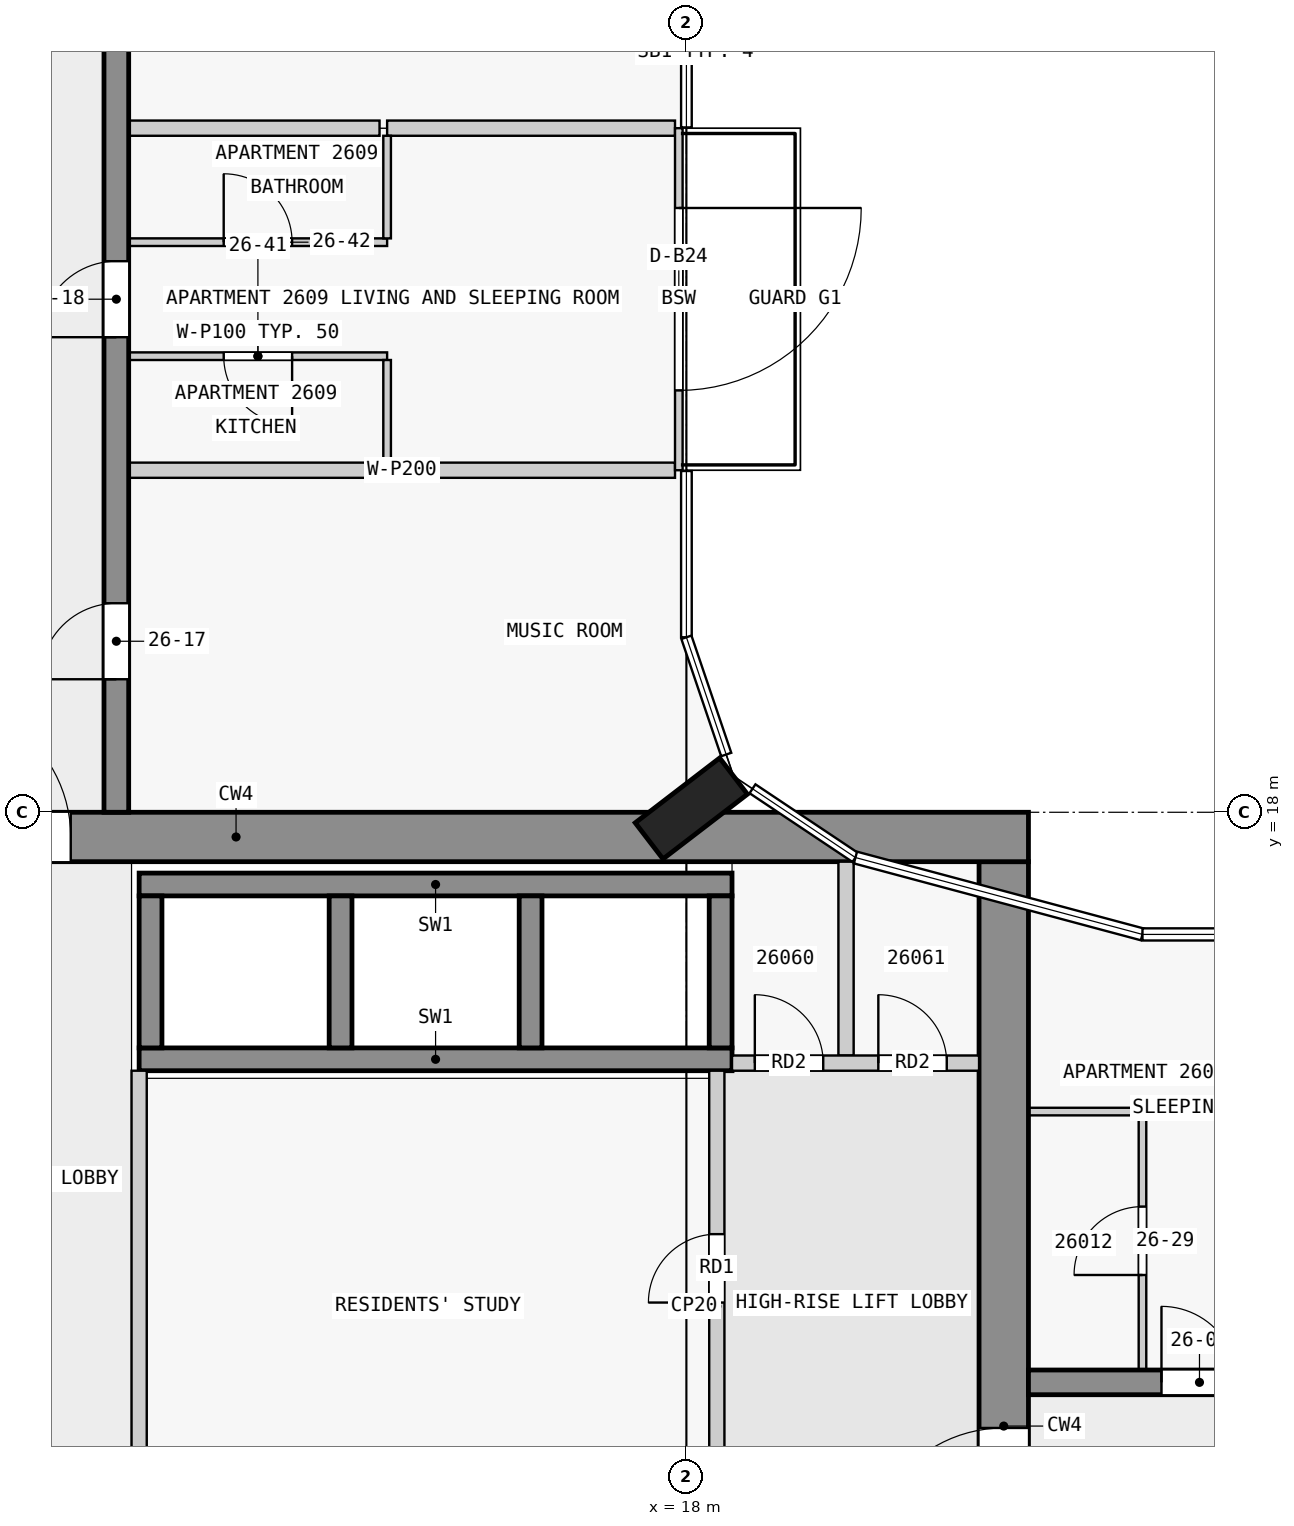
"""IFC4 building model, lengths in metres.
Left out: names, types, materials, properties, quantities, classifications, styles, units other than length and angle.
Written with IfcOpenShell. Run it as: python <this file> out.ifc"""

import sys

from ifc_helpers import new_model, si_unit, direction, frame, frame_2d, origin, origin_2d, place, context, subcontext, project, spatial, rectangle, extrude, element, fill, save


model = new_model("IFC4")
c1 = context("Model", 3, precision=1e-05, world=origin(), true_north=direction((0.0, 1.0)))
c2 = subcontext(c1, "Body", "Model", "MODEL_VIEW")
j1 = project(units=[si_unit("LENGTHUNIT", "METRE"), si_unit("PLANEANGLEUNIT", "RADIAN")], contexts=[c1])
p1 = place(None, origin())
s1 = spatial("IfcSite", under=j1, at=p1, CompositionType="ELEMENT")
p2 = place(p1, origin())
s2 = spatial("IfcBuilding", under=s1, at=p2, CompositionType="ELEMENT")
p3 = place(p2, frame((0.0, 0.0, 102.8)))
s3 = spatial("IfcBuildingStorey", under=s2, at=p3, CompositionType="ELEMENT", Elevation=102.8)
p4 = place(p3, frame((18.065, 18.05, 0.0), z_axis=(0.0, 0.0, 1.0), x_axis=(-0.608810846443, 0.793315418515, 0.0)))
e1 = element("IfcColumn", 1, at=p4, inside=s3, PredefinedType="COLUMN", context=c2, shape_type="SweptSolid", body=[
    extrude(rectangle(XDim=0.6, YDim=1.4, at=origin_2d()), origin(), (0.0, 0.0, 1.0), 3.5),
])
p5 = place(p3, frame((1.65, 17.675, 0.0), z_axis=(0.0, 0.0, 1.0), x_axis=(1.0, 0.0, 0.0)))
e2 = element("IfcWall", 2, at=p5, inside=s3, PredefinedType="SHEAR", context=c2, shape_type="SweptSolid", body=[
    extrude(rectangle(XDim=20.85, YDim=0.65, at=frame_2d((10.425, 0.0))), origin(), (0.0, 0.0, 1.0), 3.25),
])
p6 = place(p5, frame((6.45, 0.0, 0.0)))
e3 = element("IfcOpeningElement", 3, at=p6, cuts=e2, PredefinedType="OPENING", context=c2, shape_type="SweptSolid", body=[
    extrude(rectangle(XDim=1.8, YDim=2.1, at=frame_2d((0.9, 1.05))), frame((0.0, 0.335, 0.0), z_axis=(0.0, -1.0, 0.0), x_axis=(1.0, 0.0, 0.0)), (0.0, 0.0, 1.0), 0.67),
])
p7 = place(p3, frame((22.175, 2.5, 0.0), z_axis=(0.0, 0.0, 1.0), x_axis=(0.0, 1.0, 0.0)))
e4 = element("IfcWall", 4, at=p7, inside=s3, PredefinedType="SHEAR", context=c2, shape_type="SweptSolid", body=[
    extrude(rectangle(XDim=14.85, YDim=0.65, at=frame_2d((7.425, 0.0))), origin(), (0.0, 0.0, 1.0), 3.25),
])
p8 = place(p7, frame((5.6, 0.0, 0.0)))
e5 = element("IfcOpeningElement", 5, at=p8, cuts=e4, PredefinedType="OPENING", context=c2, shape_type="SweptSolid", body=[
    extrude(rectangle(XDim=1.8, YDim=2.1, at=frame_2d((0.9, 1.05))), frame((0.0, 0.335, 0.0), z_axis=(0.0, -1.0, 0.0), x_axis=(1.0, 0.0, 0.0)), (0.0, 0.0, 1.0), 0.67),
])
for number, where, z_axis, x_axis in (
    (6, (10.8, 17.05, 0.0), (0.0, 0.0, 1.0), (1.0, 0.0, 0.0)),
    (7, (10.8, 14.75, 0.0), (0.0, 0.0, 1.0), (1.0, 0.0, 0.0)),
):
    element("IfcWall", number, at=place(p3, frame(where, z_axis=z_axis, x_axis=x_axis)), inside=s3, PredefinedType="SHEAR", context=c2, shape_type="SweptSolid", body=[
        extrude(rectangle(XDim=7.8, YDim=0.3, at=frame_2d((3.9, 0.0))), origin(), (0.0, 0.0, 1.0), 3.25),
    ])
for number, where, z_axis, x_axis in (
    (8, (10.95, 14.9, 0.0), (0.0, 0.0, 1.0), (0.0, 1.0, 0.0)),
    (9, (13.45, 14.9, 0.0), (0.0, 0.0, 1.0), (0.0, 1.0, 0.0)),
    (10, (15.95, 14.9, 0.0), (0.0, 0.0, 1.0), (0.0, 1.0, 0.0)),
    (11, (18.45, 14.9, 0.0), (0.0, 0.0, 1.0), (0.0, 1.0, 0.0)),
):
    element("IfcWall", number, at=place(p3, frame(where, z_axis=z_axis, x_axis=x_axis)), inside=s3, PredefinedType="SHEAR", context=c2, shape_type="SweptSolid", body=[
        extrude(rectangle(XDim=2.0, YDim=0.3, at=frame_2d((1.0, 0.0))), origin(), (0.0, 0.0, 1.0), 3.25),
    ])
p9 = place(p3, frame((22.5, 10.5, 0.0), z_axis=(0.0, 0.0, 1.0), x_axis=(1.0, 0.0, 0.0)))
e12 = element("IfcWall", 12, at=p9, inside=s3, PredefinedType="SHEAR", context=c2, shape_type="SweptSolid", body=[
    extrude(rectangle(XDim=22.5, YDim=0.325, at=frame_2d((11.25, 0.0))), origin(), (0.0, 0.0, 1.0), 3.25),
])
p10 = place(p9, frame((1.75, 0.0, 0.0)))
e13 = element("IfcOpeningElement", 13, at=p10, cuts=e12, PredefinedType="OPENING", context=c2, shape_type="SweptSolid", body=[
    extrude(rectangle(XDim=1.0, YDim=2.1, at=frame_2d((0.5, 1.05))), frame((0.0, 0.172, 0.0), z_axis=(0.0, -1.0, 0.0), x_axis=(1.0, 0.0, 0.0)), (0.0, 0.0, 1.0), 0.345),
])
p11 = place(p9, frame((6.25, 0.0, 0.0)))
e14 = element("IfcOpeningElement", 14, at=p11, cuts=e12, PredefinedType="OPENING", context=c2, shape_type="SweptSolid", body=[
    extrude(rectangle(XDim=1.0, YDim=2.1, at=frame_2d((0.5, 1.05))), frame((0.0, 0.172, 0.0), z_axis=(0.0, -1.0, 0.0), x_axis=(1.0, 0.0, 0.0)), (0.0, 0.0, 1.0), 0.345),
])
p12 = place(p9, frame((10.85, 0.0, 0.0)))
e15 = element("IfcOpeningElement", 15, at=p12, cuts=e12, PredefinedType="OPENING", context=c2, shape_type="SweptSolid", body=[
    extrude(rectangle(XDim=0.9, YDim=2.1, at=frame_2d((0.45, 1.05))), frame((0.0, 0.172, 0.0), z_axis=(0.0, -1.0, 0.0), x_axis=(1.0, 0.0, 0.0)), (0.0, 0.0, 1.0), 0.345),
])
p13 = place(p9, frame((15.25, 0.0, 0.0)))
e16 = element("IfcOpeningElement", 16, at=p13, cuts=e12, PredefinedType="OPENING", context=c2, shape_type="SweptSolid", body=[
    extrude(rectangle(XDim=1.0, YDim=2.1, at=frame_2d((0.5, 1.05))), frame((0.0, 0.172, 0.0), z_axis=(0.0, -1.0, 0.0), x_axis=(1.0, 0.0, 0.0)), (0.0, 0.0, 1.0), 0.345),
])
p14 = place(p9, frame((18.75, 0.0, 0.0)))
e17 = element("IfcOpeningElement", 17, at=p14, cuts=e12, PredefinedType="OPENING", context=c2, shape_type="SweptSolid", body=[
    extrude(rectangle(XDim=0.9, YDim=2.1, at=frame_2d((0.45, 1.05))), frame((0.0, 0.172, 0.0), z_axis=(0.0, -1.0, 0.0), x_axis=(1.0, 0.0, 0.0)), (0.0, 0.0, 1.0), 0.345),
])
p15 = place(p9, frame((20.95, 0.0, 0.0)))
e18 = element("IfcOpeningElement", 18, at=p15, cuts=e12, PredefinedType="OPENING", context=c2, shape_type="SweptSolid", body=[
    extrude(rectangle(XDim=1.0, YDim=2.1, at=frame_2d((0.5, 1.05))), frame((0.0, 0.172, 0.0), z_axis=(0.0, -1.0, 0.0), x_axis=(1.0, 0.0, 0.0)), (0.0, 0.0, 1.0), 0.345),
])
p16 = place(p3, frame((10.5, 18.0, 0.0), z_axis=(0.0, 0.0, 1.0), x_axis=(0.0, 1.0, 0.0)))
e19 = element("IfcWall", 19, at=p16, inside=s3, PredefinedType="SHEAR", context=c2, shape_type="SweptSolid", body=[
    extrude(rectangle(XDim=27.0, YDim=0.325, at=frame_2d((13.5, 0.0))), origin(), (0.0, 0.0, 1.0), 3.25),
])
p17 = place(p16, frame((1.75, 0.0, 0.0)))
e20 = element("IfcOpeningElement", 20, at=p17, cuts=e19, PredefinedType="OPENING", context=c2, shape_type="SweptSolid", body=[
    extrude(rectangle(XDim=1.0, YDim=2.1, at=frame_2d((0.5, 1.05))), frame((0.0, 0.172, 0.0), z_axis=(0.0, -1.0, 0.0), x_axis=(1.0, 0.0, 0.0)), (0.0, 0.0, 1.0), 0.345),
])
p18 = place(p16, frame((6.25, 0.0, 0.0)))
e21 = element("IfcOpeningElement", 21, at=p18, cuts=e19, PredefinedType="OPENING", context=c2, shape_type="SweptSolid", body=[
    extrude(rectangle(XDim=1.0, YDim=2.1, at=frame_2d((0.5, 1.05))), frame((0.0, 0.172, 0.0), z_axis=(0.0, -1.0, 0.0), x_axis=(1.0, 0.0, 0.0)), (0.0, 0.0, 1.0), 0.345),
])
p19 = place(p16, frame((13.05, 0.0, 0.0)))
e22 = element("IfcOpeningElement", 22, at=p19, cuts=e19, PredefinedType="OPENING", context=c2, shape_type="SweptSolid", body=[
    extrude(rectangle(XDim=1.0, YDim=2.1, at=frame_2d((0.5, 1.05))), frame((0.0, 0.172, 0.0), z_axis=(0.0, -1.0, 0.0), x_axis=(1.0, 0.0, 0.0)), (0.0, 0.0, 1.0), 0.345),
])
p20 = place(p16, frame((21.35, 0.0, 0.0)))
e23 = element("IfcOpeningElement", 23, at=p20, cuts=e19, PredefinedType="OPENING", context=c2, shape_type="SweptSolid", body=[
    extrude(rectangle(XDim=1.0, YDim=2.1, at=frame_2d((0.5, 1.05))), frame((0.0, 0.172, 0.0), z_axis=(0.0, -1.0, 0.0), x_axis=(1.0, 0.0, 0.0)), (0.0, 0.0, 1.0), 0.345),
])
p21 = place(p3, frame((17.9, 27.0, 0.0), z_axis=(0.0, 0.0, 1.0), x_axis=(0.0, -1.0, 0.0)))
e24 = element("IfcWall", 24, at=p21, inside=s3, PredefinedType="STANDARD", context=c2, shape_type="SweptSolid", body=[
    extrude(rectangle(XDim=4.5, YDim=0.1, at=frame_2d((2.25, 0.0))), origin(), (0.0, 0.0, 1.0), 3.25),
])
p22 = place(p21, frame((1.05, 0.0, 0.0)))
e25 = element("IfcOpeningElement", 25, at=p22, cuts=e24, PredefinedType="OPENING", context=c2, shape_type="SweptSolid", body=[
    extrude(rectangle(XDim=2.4, YDim=2.4, at=frame_2d((1.2, 1.2))), frame((0.0, 0.06, 0.0), z_axis=(0.0, -1.0, 0.0), x_axis=(1.0, 0.0, 0.0)), (0.0, 0.0, 1.0), 0.12),
])
p23 = place(p3, frame((10.8, 8.4, 0.0), z_axis=(0.0, 0.0, 1.0), x_axis=(0.0, 1.0, 0.0)))
e26 = element("IfcWall", 26, at=p23, inside=s3, PredefinedType="PARTITIONING", context=c2, shape_type="SweptSolid", body=[
    extrude(rectangle(XDim=6.2, YDim=0.2, at=frame_2d((3.1, 0.0))), origin(), (0.0, 0.0, 1.0), 3.25),
])
p24 = place(p3, frame((18.4, 8.4, 0.0), z_axis=(0.0, 0.0, 1.0), x_axis=(0.0, 1.0, 0.0)))
e27 = element("IfcWall", 27, at=p24, inside=s3, PredefinedType="PARTITIONING", context=c2, shape_type="SweptSolid", body=[
    extrude(rectangle(XDim=6.2, YDim=0.2, at=frame_2d((3.1, 0.0))), origin(), (0.0, 0.0, 1.0), 3.25),
])
p25 = place(p24, frame((3.15, 0.0, 0.0)))
e28 = element("IfcOpeningElement", 28, at=p25, cuts=e27, PredefinedType="OPENING", context=c2, shape_type="SweptSolid", body=[
    extrude(rectangle(XDim=0.9, YDim=2.1, at=frame_2d((0.45, 1.05))), frame((0.0, 0.11, 0.0), z_axis=(0.0, -1.0, 0.0), x_axis=(1.0, 0.0, 0.0)), (0.0, 0.0, 1.0), 0.22),
])
p26 = place(p3, frame((18.6, 14.7, 0.0), z_axis=(0.0, 0.0, 1.0), x_axis=(1.0, 0.0, 0.0)))
e29 = element("IfcWall", 29, at=p26, inside=s3, PredefinedType="PARTITIONING", context=c2, shape_type="SweptSolid", body=[
    extrude(rectangle(XDim=3.25, YDim=0.2, at=frame_2d((1.625, 0.0))), origin(), (0.0, 0.0, 1.0), 3.25),
])
p27 = place(p26, frame((0.3, 0.0, 0.0)))
e30 = element("IfcOpeningElement", 30, at=p27, cuts=e29, PredefinedType="OPENING", context=c2, shape_type="SweptSolid", body=[
    extrude(rectangle(XDim=0.9, YDim=2.1, at=frame_2d((0.45, 1.05))), frame((0.0, 0.11, 0.0), z_axis=(0.0, -1.0, 0.0), x_axis=(1.0, 0.0, 0.0)), (0.0, 0.0, 1.0), 0.22),
])
p28 = place(p26, frame((1.925, 0.0, 0.0)))
e31 = element("IfcOpeningElement", 31, at=p28, cuts=e29, PredefinedType="OPENING", context=c2, shape_type="SweptSolid", body=[
    extrude(rectangle(XDim=0.9, YDim=2.1, at=frame_2d((0.45, 1.05))), frame((0.0, 0.11, 0.0), z_axis=(0.0, -1.0, 0.0), x_axis=(1.0, 0.0, 0.0)), (0.0, 0.0, 1.0), 0.22),
])
p29 = place(p3, frame((20.1, 14.8, 0.0), z_axis=(0.0, 0.0, 1.0), x_axis=(0.0, 1.0, 0.0)))
e32 = element("IfcWall", 32, at=p29, inside=s3, PredefinedType="PARTITIONING", context=c2, shape_type="SweptSolid", body=[
    extrude(rectangle(XDim=2.55, YDim=0.2, at=frame_2d((1.275, 0.0))), origin(), (0.0, 0.0, 1.0), 3.25),
])
p30 = place(p3, frame((23.95, 14.062, 0.0), z_axis=(0.0, 0.0, 1.0), x_axis=(-1.0, 0.0, 0.0)))
e33 = element("IfcWall", 33, at=p30, inside=s3, PredefinedType="PARTITIONING", context=c2, shape_type="SweptSolid", body=[
    extrude(rectangle(XDim=1.45, YDim=0.1, at=frame_2d((0.725, 0.0))), origin(), (0.0, 0.0, 1.0), 3.25),
])
p31 = place(p3, frame((17.85, 22.5, 0.0), z_axis=(0.0, 0.0, 1.0), x_axis=(-1.0, 0.0, 0.0)))
e34 = element("IfcWall", 34, at=p31, inside=s3, PredefinedType="PARTITIONING", context=c2, shape_type="SweptSolid", body=[
    extrude(rectangle(XDim=7.188, YDim=0.2, at=frame_2d((3.594, 0.0))), origin(), (0.0, 0.0, 1.0), 3.25),
])
p32 = place(p3, frame((14.062, 24.0, 0.0), z_axis=(0.0, 0.0, 1.0), x_axis=(-1.0, 0.0, 0.0)))
e35 = element("IfcWall", 35, at=p32, inside=s3, PredefinedType="PARTITIONING", context=c2, shape_type="SweptSolid", body=[
    extrude(rectangle(XDim=3.4, YDim=0.1, at=frame_2d((1.7, 0.0))), origin(), (0.0, 0.0, 1.0), 3.25),
])
p33 = place(p32, frame((1.25, 0.0, 0.0)))
e36 = element("IfcOpeningElement", 36, at=p33, cuts=e35, PredefinedType="OPENING", context=c2, shape_type="SweptSolid", body=[
    extrude(rectangle(XDim=0.9, YDim=2.1, at=frame_2d((0.45, 1.05))), frame((0.0, 0.06, 0.0), z_axis=(0.0, -1.0, 0.0), x_axis=(1.0, 0.0, 0.0)), (0.0, 0.0, 1.0), 0.12),
])
p34 = place(p3, frame((10.663, 25.5, 0.0), z_axis=(0.0, 0.0, 1.0), x_axis=(1.0, 0.0, 0.0)))
e37 = element("IfcWall", 37, at=p34, inside=s3, PredefinedType="PARTITIONING", context=c2, shape_type="SweptSolid", body=[
    extrude(rectangle(XDim=3.4, YDim=0.1, at=frame_2d((1.7, 0.0))), origin(), (0.0, 0.0, 1.0), 3.25),
])
p35 = place(p34, frame((1.25, 0.0, 0.0)))
e38 = element("IfcOpeningElement", 38, at=p35, cuts=e37, PredefinedType="OPENING", context=c2, shape_type="SweptSolid", body=[
    extrude(rectangle(XDim=0.9, YDim=2.1, at=frame_2d((0.45, 1.05))), frame((0.0, 0.06, 0.0), z_axis=(0.0, -1.0, 0.0), x_axis=(1.0, 0.0, 0.0)), (0.0, 0.0, 1.0), 0.12),
])
p36 = place(p3, frame((13.962, 27.0, 0.0), z_axis=(0.0, 0.0, 1.0), x_axis=(-1.0, 0.0, 0.0)))
e39 = element("IfcWall", 39, at=p36, inside=s3, PredefinedType="PARTITIONING", context=c2, shape_type="SweptSolid", body=[
    extrude(rectangle(XDim=3.3, YDim=0.2, at=frame_2d((1.65, 0.0))), origin(), (0.0, 0.0, 1.0), 3.25),
])
p37 = place(p3, frame((14.062, 27.0, 0.0), z_axis=(0.0, 0.0, 1.0), x_axis=(1.0, 0.0, 0.0)))
e40 = element("IfcWall", 40, at=p37, inside=s3, PredefinedType="PARTITIONING", context=c2, shape_type="SweptSolid", body=[
    extrude(rectangle(XDim=3.788, YDim=0.2, at=frame_2d((1.894, 0.0))), origin(), (0.0, 0.0, 1.0), 3.25),
])
for number, where, z_axis, x_axis in (
    (41, (14.062, 22.6, 0.0), (0.0, 0.0, 1.0), (0.0, 1.0, 0.0)),
    (42, (14.062, 25.55, 0.0), (0.0, 0.0, 1.0), (0.0, 1.0, 0.0)),
):
    element("IfcWall", number, at=place(p3, frame(where, z_axis=z_axis, x_axis=x_axis)), inside=s3, PredefinedType="PARTITIONING", context=c2, shape_type="SweptSolid", body=[
        extrude(rectangle(XDim=1.35, YDim=0.1, at=frame_2d((0.675, 0.0))), origin(), (0.0, 0.0, 1.0), 3.25),
    ])
p38 = place(p3, frame((24.0, 10.663, 0.0), z_axis=(0.0, 0.0, 1.0), x_axis=(0.0, 1.0, 0.0)))
e43 = element("IfcWall", 43, at=p38, inside=s3, PredefinedType="PARTITIONING", context=c2, shape_type="SweptSolid", body=[
    extrude(rectangle(XDim=3.4, YDim=0.1, at=frame_2d((1.7, 0.0))), origin(), (0.0, 0.0, 1.0), 3.25),
])
p39 = place(p38, frame((1.25, 0.0, 0.0)))
e44 = element("IfcOpeningElement", 44, at=p39, cuts=e43, PredefinedType="OPENING", context=c2, shape_type="SweptSolid", body=[
    extrude(rectangle(XDim=0.9, YDim=2.1, at=frame_2d((0.45, 1.05))), frame((0.0, 0.06, 0.0), z_axis=(0.0, -1.0, 0.0), x_axis=(1.0, 0.0, 0.0)), (0.0, 0.0, 1.0), 0.12),
])
p40 = place(p22, origin())
e45 = element("IfcDoor", 45, at=p40, inside=s3, OperationType="SINGLE_SWING_LEFT", PredefinedType="DOOR", context=c2, shape_type="SweptSolid", body=[
    extrude(rectangle(XDim=2.4, YDim=2.4, at=frame_2d((1.2, 1.2))), frame((0.0, 0.025, 0.0), z_axis=(0.0, -1.0, 0.0), x_axis=(1.0, 0.0, 0.0)), (0.0, 0.0, 1.0), 0.05),
])
fill(e25, e45)
p41 = place(p25, origin())
e46 = element("IfcDoor", 46, at=p41, inside=s3, OperationType="SINGLE_SWING_LEFT", PredefinedType="DOOR", context=c2, shape_type="SweptSolid", body=[
    extrude(rectangle(XDim=0.9, YDim=2.1, at=frame_2d((0.45, 1.05))), frame((0.0, 0.025, 0.0), z_axis=(0.0, -1.0, 0.0), x_axis=(1.0, 0.0, 0.0)), (0.0, 0.0, 1.0), 0.05),
])
fill(e28, e46)
p42 = place(p8, origin())
e47 = element("IfcDoor", 47, at=p42, inside=s3, OperationType="DOUBLE_DOOR_SINGLE_SWING", PredefinedType="DOOR", context=c2, shape_type="SweptSolid", body=[
    extrude(rectangle(XDim=1.8, YDim=2.1, at=frame_2d((0.9, 1.05))), frame((0.0, 0.025, 0.0), z_axis=(0.0, -1.0, 0.0), x_axis=(1.0, 0.0, 0.0)), (0.0, 0.0, 1.0), 0.05),
])
fill(e5, e47)
p43 = place(p6, origin())
e48 = element("IfcDoor", 48, at=p43, inside=s3, OperationType="DOUBLE_DOOR_SINGLE_SWING", PredefinedType="DOOR", context=c2, shape_type="SweptSolid", body=[
    extrude(rectangle(XDim=1.8, YDim=2.1, at=frame_2d((0.9, 1.05))), frame((0.0, 0.025, 0.0), z_axis=(0.0, -1.0, 0.0), x_axis=(1.0, 0.0, 0.0)), (0.0, 0.0, 1.0), 0.05),
])
fill(e3, e48)
p44 = place(p27, origin())
e49 = element("IfcDoor", 49, at=p44, inside=s3, OperationType="SINGLE_SWING_LEFT", PredefinedType="DOOR", context=c2, shape_type="SweptSolid", body=[
    extrude(rectangle(XDim=0.9, YDim=2.1, at=frame_2d((0.45, 1.05))), frame((0.0, 0.025, 0.0), z_axis=(0.0, -1.0, 0.0), x_axis=(1.0, 0.0, 0.0)), (0.0, 0.0, 1.0), 0.05),
])
fill(e30, e49)
p45 = place(p28, origin())
e50 = element("IfcDoor", 50, at=p45, inside=s3, OperationType="SINGLE_SWING_LEFT", PredefinedType="DOOR", context=c2, shape_type="SweptSolid", body=[
    extrude(rectangle(XDim=0.9, YDim=2.1, at=frame_2d((0.45, 1.05))), frame((0.0, 0.025, 0.0), z_axis=(0.0, -1.0, 0.0), x_axis=(1.0, 0.0, 0.0)), (0.0, 0.0, 1.0), 0.05),
])
fill(e31, e50)
p46 = place(p10, origin())
e51 = element("IfcDoor", 51, at=p46, inside=s3, OperationType="SINGLE_SWING_LEFT", PredefinedType="DOOR", context=c2, shape_type="SweptSolid", body=[
    extrude(rectangle(XDim=1.0, YDim=2.1, at=frame_2d((0.5, 1.05))), frame((0.0, 0.025, 0.0), z_axis=(0.0, -1.0, 0.0), x_axis=(1.0, 0.0, 0.0)), (0.0, 0.0, 1.0), 0.05),
])
fill(e13, e51)
p47 = place(p17, origin())
e52 = element("IfcDoor", 52, at=p47, inside=s3, OperationType="SINGLE_SWING_LEFT", PredefinedType="DOOR", context=c2, shape_type="SweptSolid", body=[
    extrude(rectangle(XDim=1.0, YDim=2.1, at=frame_2d((0.5, 1.05))), frame((0.0, 0.025, 0.0), z_axis=(0.0, -1.0, 0.0), x_axis=(1.0, 0.0, 0.0)), (0.0, 0.0, 1.0), 0.05),
])
fill(e20, e52)
p48 = place(p18, origin())
e53 = element("IfcDoor", 53, at=p48, inside=s3, OperationType="SINGLE_SWING_LEFT", PredefinedType="DOOR", context=c2, shape_type="SweptSolid", body=[
    extrude(rectangle(XDim=1.0, YDim=2.1, at=frame_2d((0.5, 1.05))), frame((0.0, 0.025, 0.0), z_axis=(0.0, -1.0, 0.0), x_axis=(1.0, 0.0, 0.0)), (0.0, 0.0, 1.0), 0.05),
])
fill(e21, e53)
p49 = place(p39, origin())
e54 = element("IfcDoor", 54, at=p49, inside=s3, OperationType="SINGLE_SWING_LEFT", PredefinedType="DOOR", context=c2, shape_type="SweptSolid", body=[
    extrude(rectangle(XDim=0.9, YDim=2.1, at=frame_2d((0.45, 1.05))), frame((0.0, 0.025, 0.0), z_axis=(0.0, -1.0, 0.0), x_axis=(1.0, 0.0, 0.0)), (0.0, 0.0, 1.0), 0.05),
])
fill(e44, e54)
p50 = place(p33, origin())
e55 = element("IfcDoor", 55, at=p50, inside=s3, OperationType="SINGLE_SWING_LEFT", PredefinedType="DOOR", context=c2, shape_type="SweptSolid", body=[
    extrude(rectangle(XDim=0.9, YDim=2.1, at=frame_2d((0.45, 1.05))), frame((0.0, 0.025, 0.0), z_axis=(0.0, -1.0, 0.0), x_axis=(1.0, 0.0, 0.0)), (0.0, 0.0, 1.0), 0.05),
])
fill(e36, e55)
p51 = place(p35, origin())
e56 = element("IfcDoor", 56, at=p51, inside=s3, OperationType="SINGLE_SWING_LEFT", PredefinedType="DOOR", context=c2, shape_type="SweptSolid", body=[
    extrude(rectangle(XDim=0.9, YDim=2.1, at=frame_2d((0.45, 1.05))), frame((0.0, 0.025, 0.0), z_axis=(0.0, -1.0, 0.0), x_axis=(1.0, 0.0, 0.0)), (0.0, 0.0, 1.0), 0.05),
])
fill(e38, e56)
save(model, sys.argv[1])
